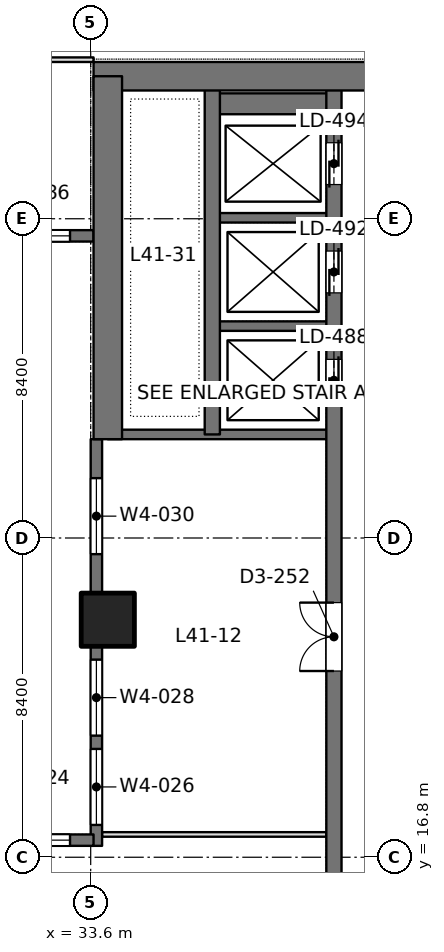
"""IFC4 building model, lengths in metres.
Left out: names, types, materials, properties, quantities, classifications, styles, units other than length and angle.
Written with IfcOpenShell. Run it as: python <this file> out.ifc"""

import sys

from ifc_helpers import new_model, si_unit, direction, frame, frame_2d, origin, origin_2d, place, context, subcontext, project, spatial, rectangle, extrude, element, fill, save


model = new_model("IFC4")
c1 = context("Model", 3, precision=1e-05, world=origin(), true_north=direction((0.0, 1.0)))
c2 = subcontext(c1, "Body", "Model", "MODEL_VIEW")
j1 = project(units=[si_unit("LENGTHUNIT", "METRE"), si_unit("PLANEANGLEUNIT", "RADIAN")], contexts=[c1])
p1 = place(None, origin())
s1 = spatial("IfcSite", under=j1, at=p1, CompositionType="ELEMENT")
p2 = place(p1, origin())
s2 = spatial("IfcBuilding", under=s1, at=p2, CompositionType="ELEMENT")
p3 = place(p2, frame((0.0, 0.0, 181.8)))
s3 = spatial("IfcBuildingStorey", under=s2, at=p3, CompositionType="ELEMENT", Elevation=181.8)
p4 = place(p3, frame((34.05, 23.05, 0.0), z_axis=(0.0, 0.0, 1.0), x_axis=(1.0, 0.0, 0.0)))
e1 = element("IfcColumn", 1, at=p4, inside=s3, PredefinedType="COLUMN", context=c2, shape_type="SweptSolid", body=[
    extrude(rectangle(XDim=1.4, YDim=1.4, at=origin_2d()), origin(), (0.0, 0.0, 1.0), 4.2),
])
p5 = place(p3, frame((33.675, 37.35, 0.0), z_axis=(0.0, 0.0, 1.0), x_axis=(1.0, 0.0, 0.0)))
e2 = element("IfcWall", 2, at=p5, inside=s3, PredefinedType="SHEAR", context=c2, shape_type="SweptSolid", body=[
    extrude(rectangle(XDim=17.85, YDim=0.75, at=frame_2d((8.925, 0.0))), origin(), (0.0, 0.0, 1.0), 4.2),
])
p6 = place(p5, frame((7.175, 0.0, 0.0)))
e3 = element("IfcOpeningElement", 3, at=p6, cuts=e2, PredefinedType="OPENING", context=c2, shape_type="SweptSolid", body=[
    extrude(rectangle(XDim=1.8, YDim=2.4, at=frame_2d((0.9, 1.2))), frame((0.0, 0.385, 0.0), z_axis=(0.0, -1.0, 0.0), x_axis=(1.0, 0.0, 0.0)), (0.0, 0.0, 1.0), 0.77),
])
p7 = place(p3, frame((34.05, 27.8, 0.0), z_axis=(0.0, 0.0, 1.0), x_axis=(0.0, 1.0, 0.0)))
e4 = element("IfcWall", 4, at=p7, inside=s3, PredefinedType="SHEAR", context=c2, shape_type="SweptSolid", body=[
    extrude(rectangle(XDim=9.55, YDim=0.75, at=frame_2d((4.775, 0.0))), origin(), (0.0, 0.0, 1.0), 4.2),
])
p8 = place(p3, frame((40.0, 13.05, 0.0), z_axis=(0.0, 0.0, 1.0), x_axis=(0.0, 1.0, 0.0)))
e5 = element("IfcWall", 5, at=p8, inside=s3, PredefinedType="SHEAR", context=c2, shape_type="SweptSolid", body=[
    extrude(rectangle(XDim=24.3, YDim=0.4, at=frame_2d((12.15, 0.0))), origin(), (0.0, 0.0, 1.0), 4.2),
])
p9 = place(p8, frame((15.75, 0.0, 0.0)))
e6 = element("IfcOpeningElement", 6, at=p9, cuts=e5, PredefinedType="OPENING", context=c2, shape_type="SweptSolid", body=[
    extrude(rectangle(XDim=1.1, YDim=2.2, at=frame_2d((0.55, 1.1))), frame((0.0, 0.21, 0.0), z_axis=(0.0, -1.0, 0.0), x_axis=(1.0, 0.0, 0.0)), (0.0, 0.0, 1.0), 0.42),
])
p10 = place(p8, frame((18.6, 0.0, 0.0)))
e7 = element("IfcOpeningElement", 7, at=p10, cuts=e5, PredefinedType="OPENING", context=c2, shape_type="SweptSolid", body=[
    extrude(rectangle(XDim=1.1, YDim=2.2, at=frame_2d((0.55, 1.1))), frame((0.0, 0.21, 0.0), z_axis=(0.0, -1.0, 0.0), x_axis=(1.0, 0.0, 0.0)), (0.0, 0.0, 1.0), 0.42),
])
p11 = place(p8, frame((21.45, 0.0, 0.0)))
e8 = element("IfcOpeningElement", 8, at=p11, cuts=e5, PredefinedType="OPENING", context=c2, shape_type="SweptSolid", body=[
    extrude(rectangle(XDim=1.1, YDim=2.2, at=frame_2d((0.55, 1.1))), frame((0.0, 0.21, 0.0), z_axis=(0.0, -1.0, 0.0), x_axis=(1.0, 0.0, 0.0)), (0.0, 0.0, 1.0), 0.42),
])
p12 = place(p8, frame((8.65, 0.0, 0.0)))
e9 = element("IfcOpeningElement", 9, at=p12, cuts=e5, PredefinedType="OPENING", context=c2, shape_type="SweptSolid", body=[
    extrude(rectangle(XDim=1.8, YDim=2.4, at=frame_2d((0.9, 1.2))), frame((0.0, 0.21, 0.0), z_axis=(0.0, -1.0, 0.0), x_axis=(1.0, 0.0, 0.0)), (0.0, 0.0, 1.0), 0.42),
])
p13 = place(p3, frame((36.8, 27.925, 0.0), z_axis=(0.0, 0.0, 1.0), x_axis=(0.0, 1.0, 0.0)))
e10 = element("IfcWall", 10, at=p13, inside=s3, PredefinedType="SHEAR", context=c2, shape_type="SweptSolid", body=[
    extrude(rectangle(XDim=9.425, YDim=0.4, at=frame_2d((4.712, 0.0))), origin(), (0.0, 0.0, 1.0), 4.2),
])
p14 = place(p3, frame((40.0, 27.925, 0.0), z_axis=(0.0, 0.0, 1.0), x_axis=(-1.0, 0.0, 0.0)))
e11 = element("IfcWall", 11, at=p14, inside=s3, PredefinedType="SHEAR", context=c2, shape_type="SweptSolid", body=[
    extrude(rectangle(XDim=5.95, YDim=0.25, at=frame_2d((2.975, 0.0))), origin(), (0.0, 0.0, 1.0), 4.2),
])
for number, where, z_axis, x_axis in (
    (12, (40.0, 30.775, 0.0), (0.0, 0.0, 1.0), (-1.0, 0.0, 0.0)),
    (13, (40.0, 33.625, 0.0), (0.0, 0.0, 1.0), (-1.0, 0.0, 0.0)),
):
    element("IfcWall", number, at=place(p3, frame(where, z_axis=z_axis, x_axis=x_axis)), inside=s3, PredefinedType="SHEAR", context=c2, shape_type="SweptSolid", body=[
        extrude(rectangle(XDim=3.2, YDim=0.25, at=frame_2d((1.6, 0.0))), origin(), (0.0, 0.0, 1.0), 4.2),
    ])
p15 = place(p3, frame((40.0, 36.625, 0.0), z_axis=(0.0, 0.0, 1.0), x_axis=(-1.0, 0.0, 0.0)))
e14 = element("IfcWall", 14, at=p15, inside=s3, PredefinedType="SHEAR", context=c2, shape_type="SweptSolid", body=[
    extrude(rectangle(XDim=3.2, YDim=0.55, at=frame_2d((1.6, 0.0))), origin(), (0.0, 0.0, 1.0), 4.2),
])
p16 = place(p3, frame((33.75, 17.1, 0.0), z_axis=(0.0, 0.0, 1.0), x_axis=(0.0, 1.0, 0.0)))
e15 = element("IfcWall", 15, at=p16, inside=s3, PredefinedType="SOLIDWALL", context=c2, shape_type="SweptSolid", body=[
    extrude(rectangle(XDim=10.7, YDim=0.3, at=frame_2d((5.35, 0.0))), origin(), (0.0, 0.0, 1.0), 4.05),
])
p17 = place(p16, frame((0.55, 0.0, 0.9)))
e16 = element("IfcOpeningElement", 16, at=p17, cuts=e15, PredefinedType="OPENING", context=c2, shape_type="SweptSolid", body=[
    extrude(rectangle(XDim=2.0, YDim=1.9, at=frame_2d((1.0, 0.95))), frame((0.0, 0.16, 0.0), z_axis=(0.0, -1.0, 0.0), x_axis=(1.0, 0.0, 0.0)), (0.0, 0.0, 1.0), 0.32),
])
p18 = place(p16, frame((2.9, 0.0, 0.9)))
e17 = element("IfcOpeningElement", 17, at=p18, cuts=e15, PredefinedType="OPENING", context=c2, shape_type="SweptSolid", body=[
    extrude(rectangle(XDim=2.0, YDim=1.9, at=frame_2d((1.0, 0.95))), frame((0.0, 0.16, 0.0), z_axis=(0.0, -1.0, 0.0), x_axis=(1.0, 0.0, 0.0)), (0.0, 0.0, 1.0), 0.32),
])
p19 = place(p16, frame((7.675, 0.0, 0.9)))
e18 = element("IfcOpeningElement", 18, at=p19, cuts=e15, PredefinedType="OPENING", context=c2, shape_type="SweptSolid", body=[
    extrude(rectangle(XDim=2.0, YDim=1.9, at=frame_2d((1.0, 0.95))), frame((0.0, 0.16, 0.0), z_axis=(0.0, -1.0, 0.0), x_axis=(1.0, 0.0, 0.0)), (0.0, 0.0, 1.0), 0.32),
])
p20 = place(p3, frame((25.75, 17.25, 0.0), z_axis=(0.0, 0.0, 1.0), x_axis=(1.0, 0.0, 0.0)))
e19 = element("IfcWall", 19, at=p20, inside=s3, PredefinedType="SOLIDWALL", context=c2, shape_type="SweptSolid", body=[
    extrude(rectangle(XDim=7.925, YDim=0.3, at=frame_2d((3.962, 0.0))), origin(), (0.0, 0.0, 1.0), 4.05),
])
p21 = place(p20, frame((0.069, 0.0, 0.9)))
e20 = element("IfcOpeningElement", 20, at=p21, cuts=e19, PredefinedType="OPENING", context=c2, shape_type="SweptSolid", body=[
    extrude(rectangle(XDim=2.0, YDim=1.9, at=frame_2d((1.0, 0.95))), frame((0.0, 0.16, 0.0), z_axis=(0.0, -1.0, 0.0), x_axis=(1.0, 0.0, 0.0)), (0.0, 0.0, 1.0), 0.32),
])
p22 = place(p20, frame((2.688, 0.0, 0.9)))
e21 = element("IfcOpeningElement", 21, at=p22, cuts=e19, PredefinedType="OPENING", context=c2, shape_type="SweptSolid", body=[
    extrude(rectangle(XDim=2.0, YDim=1.9, at=frame_2d((1.0, 0.95))), frame((0.0, 0.16, 0.0), z_axis=(0.0, -1.0, 0.0), x_axis=(1.0, 0.0, 0.0)), (0.0, 0.0, 1.0), 0.32),
])
p23 = place(p20, frame((5.306, 0.0, 0.9)))
e22 = element("IfcOpeningElement", 22, at=p23, cuts=e19, PredefinedType="OPENING", context=c2, shape_type="SweptSolid", body=[
    extrude(rectangle(XDim=2.0, YDim=1.9, at=frame_2d((1.0, 0.95))), frame((0.0, 0.16, 0.0), z_axis=(0.0, -1.0, 0.0), x_axis=(1.0, 0.0, 0.0)), (0.0, 0.0, 1.0), 0.32),
])
p24 = place(p3, frame((25.75, 33.15, 0.0), z_axis=(0.0, 0.0, 1.0), x_axis=(1.0, 0.0, 0.0)))
e23 = element("IfcWall", 23, at=p24, inside=s3, PredefinedType="SOLIDWALL", context=c2, shape_type="SweptSolid", body=[
    extrude(rectangle(XDim=7.925, YDim=0.3, at=frame_2d((3.962, 0.0))), origin(), (0.0, 0.0, 1.0), 4.05),
])
p25 = place(p24, frame((0.069, 0.0, 0.9)))
e24 = element("IfcOpeningElement", 24, at=p25, cuts=e23, PredefinedType="OPENING", context=c2, shape_type="SweptSolid", body=[
    extrude(rectangle(XDim=2.0, YDim=1.9, at=frame_2d((1.0, 0.95))), frame((0.0, 0.16, 0.0), z_axis=(0.0, -1.0, 0.0), x_axis=(1.0, 0.0, 0.0)), (0.0, 0.0, 1.0), 0.32),
])
p26 = place(p24, frame((2.688, 0.0, 0.9)))
e25 = element("IfcOpeningElement", 25, at=p26, cuts=e23, PredefinedType="OPENING", context=c2, shape_type="SweptSolid", body=[
    extrude(rectangle(XDim=2.0, YDim=1.9, at=frame_2d((1.0, 0.95))), frame((0.0, 0.16, 0.0), z_axis=(0.0, -1.0, 0.0), x_axis=(1.0, 0.0, 0.0)), (0.0, 0.0, 1.0), 0.32),
])
p27 = place(p24, frame((5.306, 0.0, 0.9)))
e26 = element("IfcOpeningElement", 26, at=p27, cuts=e23, PredefinedType="OPENING", context=c2, shape_type="SweptSolid", body=[
    extrude(rectangle(XDim=2.0, YDim=1.9, at=frame_2d((1.0, 0.95))), frame((0.0, 0.16, 0.0), z_axis=(0.0, -1.0, 0.0), x_axis=(1.0, 0.0, 0.0)), (0.0, 0.0, 1.0), 0.32),
])
p28 = place(p3, frame((33.898, 17.4, 0.0), z_axis=(0.0, 0.0, 1.0), x_axis=(1.0, 0.0, 0.0)))
e27 = element("IfcWall", 27, at=p28, inside=s3, PredefinedType="PARTITIONING", context=c2, shape_type="SweptSolid", body=[
    extrude(rectangle(XDim=5.904, YDim=0.12, at=frame_2d((2.952, 0.0))), origin(), (0.0, 0.0, 1.0), 3.55),
])
p29 = place(p3, frame((16.725, 37.785, 0.0), z_axis=(0.0, 0.0, 1.0), x_axis=(1.0, 0.0, 0.0)))
e28 = element("IfcWall", 28, at=p29, inside=s3, PredefinedType="PARTITIONING", context=c2, shape_type="SweptSolid", body=[
    extrude(rectangle(XDim=16.95, YDim=0.12, at=frame_2d((8.475, 0.0))), origin(), (0.0, 0.0, 1.0), 3.55),
])
p30 = place(p29, frame((7.575, 0.0, 0.0)))
e29 = element("IfcOpeningElement", 29, at=p30, cuts=e28, PredefinedType="OPENING", context=c2, shape_type="SweptSolid", body=[
    extrude(rectangle(XDim=1.8, YDim=2.2, at=frame_2d((0.9, 1.1))), frame((0.0, 0.07, 0.0), z_axis=(0.0, -1.0, 0.0), x_axis=(1.0, 0.0, 0.0)), (0.0, 0.0, 1.0), 0.14),
])
p31 = place(p17, origin())
e30 = element("IfcWindow", 30, at=p31, inside=s3, PartitioningType="SINGLE_PANEL", PredefinedType="WINDOW", context=c2, shape_type="SweptSolid", body=[
    extrude(rectangle(XDim=2.0, YDim=1.9, at=frame_2d((1.0, 0.95))), frame((0.0, 0.03, 0.0), z_axis=(0.0, -1.0, 0.0), x_axis=(1.0, 0.0, 0.0)), (0.0, 0.0, 1.0), 0.06),
])
fill(e16, e30)
p32 = place(p18, origin())
e31 = element("IfcWindow", 31, at=p32, inside=s3, PartitioningType="SINGLE_PANEL", PredefinedType="WINDOW", context=c2, shape_type="SweptSolid", body=[
    extrude(rectangle(XDim=2.0, YDim=1.9, at=frame_2d((1.0, 0.95))), frame((0.0, 0.03, 0.0), z_axis=(0.0, -1.0, 0.0), x_axis=(1.0, 0.0, 0.0)), (0.0, 0.0, 1.0), 0.06),
])
fill(e17, e31)
p33 = place(p19, origin())
e32 = element("IfcWindow", 32, at=p33, inside=s3, PartitioningType="SINGLE_PANEL", PredefinedType="WINDOW", context=c2, shape_type="SweptSolid", body=[
    extrude(rectangle(XDim=2.0, YDim=1.9, at=frame_2d((1.0, 0.95))), frame((0.0, 0.03, 0.0), z_axis=(0.0, -1.0, 0.0), x_axis=(1.0, 0.0, 0.0)), (0.0, 0.0, 1.0), 0.06),
])
fill(e18, e32)
p34 = place(p23, origin())
e33 = element("IfcWindow", 33, at=p34, inside=s3, PartitioningType="SINGLE_PANEL", PredefinedType="WINDOW", context=c2, shape_type="SweptSolid", body=[
    extrude(rectangle(XDim=2.0, YDim=1.9, at=frame_2d((1.0, 0.95))), frame((0.0, 0.03, 0.0), z_axis=(0.0, -1.0, 0.0), x_axis=(1.0, 0.0, 0.0)), (0.0, 0.0, 1.0), 0.06),
])
fill(e22, e33)
p35 = place(p27, origin())
e34 = element("IfcWindow", 34, at=p35, inside=s3, PartitioningType="SINGLE_PANEL", PredefinedType="WINDOW", context=c2, shape_type="SweptSolid", body=[
    extrude(rectangle(XDim=2.0, YDim=1.9, at=frame_2d((1.0, 0.95))), frame((0.0, 0.03, 0.0), z_axis=(0.0, -1.0, 0.0), x_axis=(1.0, 0.0, 0.0)), (0.0, 0.0, 1.0), 0.06),
])
fill(e26, e34)
p36 = place(p9, origin())
e35 = element("IfcDoor", 35, at=p36, inside=s3, OperationType="DOUBLE_DOOR_SLIDING", PredefinedType="DOOR", context=c2, shape_type="SweptSolid", body=[
    extrude(rectangle(XDim=1.1, YDim=2.2, at=frame_2d((0.55, 1.1))), frame((0.0, 0.025, 0.0), z_axis=(0.0, -1.0, 0.0), x_axis=(1.0, 0.0, 0.0)), (0.0, 0.0, 1.0), 0.05),
])
fill(e6, e35)
p37 = place(p10, origin())
e36 = element("IfcDoor", 36, at=p37, inside=s3, OperationType="DOUBLE_DOOR_SLIDING", PredefinedType="DOOR", context=c2, shape_type="SweptSolid", body=[
    extrude(rectangle(XDim=1.1, YDim=2.2, at=frame_2d((0.55, 1.1))), frame((0.0, 0.025, 0.0), z_axis=(0.0, -1.0, 0.0), x_axis=(1.0, 0.0, 0.0)), (0.0, 0.0, 1.0), 0.05),
])
fill(e7, e36)
p38 = place(p11, origin())
e37 = element("IfcDoor", 37, at=p38, inside=s3, OperationType="DOUBLE_DOOR_SLIDING", PredefinedType="DOOR", context=c2, shape_type="SweptSolid", body=[
    extrude(rectangle(XDim=1.1, YDim=2.2, at=frame_2d((0.55, 1.1))), frame((0.0, 0.025, 0.0), z_axis=(0.0, -1.0, 0.0), x_axis=(1.0, 0.0, 0.0)), (0.0, 0.0, 1.0), 0.05),
])
fill(e8, e37)
p39 = place(p12, origin())
e38 = element("IfcDoor", 38, at=p39, inside=s3, OperationType="DOUBLE_DOOR_SINGLE_SWING", PredefinedType="DOOR", context=c2, shape_type="SweptSolid", body=[
    extrude(rectangle(XDim=1.8, YDim=2.4, at=frame_2d((0.9, 1.2))), frame((0.0, 0.025, 0.0), z_axis=(0.0, -1.0, 0.0), x_axis=(1.0, 0.0, 0.0)), (0.0, 0.0, 1.0), 0.05),
])
fill(e9, e38)
save(model, sys.argv[1])
